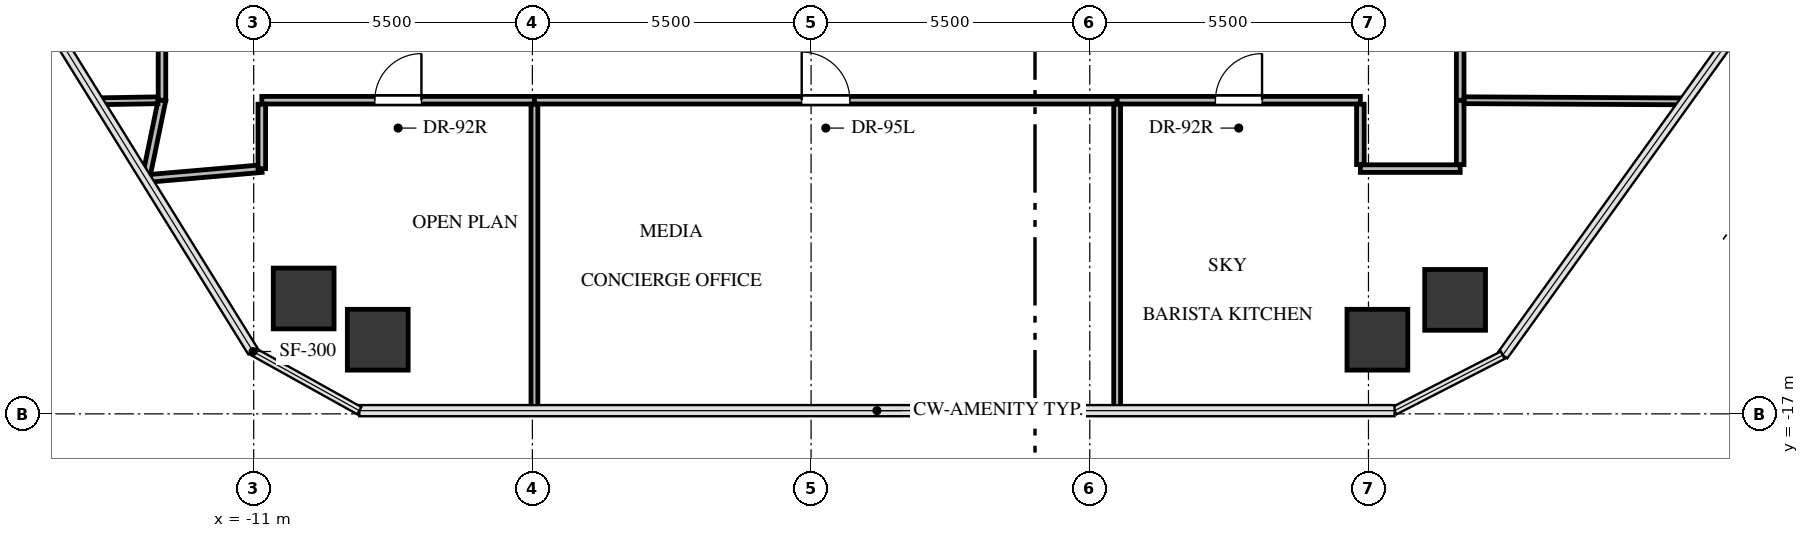
"""IFC4 building model, lengths in metres.
Left out: names, types, materials, properties, quantities, classifications, styles, units other than length and angle.
Written with IfcOpenShell. Run it as: python <this file> out.ifc"""

import sys

from ifc_helpers import new_model, si_unit, direction, frame, frame_2d, origin, origin_2d, place, context, subcontext, project, spatial, rectangle, extrude, source, transform, mapped, element, fill, save


model = new_model("IFC4")
c1 = context("Model", 3, precision=1e-05, world=origin(), true_north=direction((0.0, 1.0)))
c2 = subcontext(c1, "Body", "Model", "MODEL_VIEW")
j1 = project(units=[si_unit("LENGTHUNIT", "METRE"), si_unit("PLANEANGLEUNIT", "RADIAN")], contexts=[c1])
p1 = place(None, origin())
s1 = spatial("IfcSite", under=j1, at=p1, CompositionType="ELEMENT")
p2 = place(p1, origin())
s2 = spatial("IfcBuilding", under=s1, at=p2, CompositionType="ELEMENT")
p3 = place(p2, frame((0.0, 0.0, 93.3)))
s3 = spatial("IfcBuildingStorey", under=s2, at=p3, CompositionType="ELEMENT", Elevation=93.3)
m1 = source(origin(), c2, "Body", "SweptSolid", [
    extrude(rectangle(XDim=1.2, YDim=1.2, at=origin_2d()), origin(), (0.0, 0.0, 1.0), 4.26),
])
for number, where, z_axis, x_axis in (
    (1, (-10.014, -14.723, -0.3), (0.0, 0.0, 1.0), (1.0, 0.0, 0.0)),
    (2, (12.71, -14.75, -0.3), (0.0, 0.0, 1.0), (1.0, 0.0, 0.0)),
    (3, (11.176, -15.537, -0.3), (0.0, 0.0, 1.0), (1.0, 0.0, 0.0)),
    (4, (-8.552, -15.537, -0.3), (0.0, 0.0, 1.0), (1.0, 0.0, 0.0)),
):
    element("IfcColumn", number, at=place(p3, frame(where, z_axis=z_axis, x_axis=x_axis)), inside=s3, PredefinedType="COLUMN", context=c2, shape_type="MappedRepresentation", body=[
        mapped(m1, transform((0.0, 0.0, 0.0), x_axis=(1.0, 0.0, 0.0), y_axis=(0.0, 1.0, 0.0), z_axis=(0.0, 0.0, 1.0), scale=1.0)),
    ])
p4 = place(p3, frame((-10.84, -10.81, 0.0), z_axis=(0.0, 0.0, 1.0), x_axis=(1.0, 0.0, 0.0)))
e5 = element("IfcWall", 5, at=p4, inside=s3, PredefinedType="PARTITIONING", context=c2, shape_type="SweptSolid", body=[
    extrude(rectangle(XDim=5.38, YDim=0.15, at=frame_2d((2.69, 0.0))), origin(), (0.0, 0.0, 1.0), 3.112),
])
p5 = place(p4, frame((2.23, 0.0, 0.0)))
e6 = element("IfcOpeningElement", 6, at=p5, cuts=e5, PredefinedType="OPENING", context=c2, shape_type="SweptSolid", body=[
    extrude(rectangle(XDim=0.92, YDim=2.1, at=frame_2d((0.46, 1.05))), frame((0.0, 0.085, 0.0), z_axis=(0.0, -1.0, 0.0), x_axis=(1.0, 0.0, 0.0)), (0.0, 0.0, 1.0), 0.17),
])
p6 = place(p3, frame((-13.129, -12.358, 0.0), z_axis=(0.0, 0.0, 1.0), x_axis=(0.996279168698, 0.086184789953, 0.0)))
e7 = element("IfcWall", 7, at=p6, inside=s3, PredefinedType="PARTITIONING", context=c2, shape_type="SweptSolid", body=[
    extrude(rectangle(XDim=2.297, YDim=0.15, at=frame_2d((1.149, 0.0))), origin(), (0.0, 0.0, 1.0), 3.28),
])
p7 = place(p3, frame((-12.81, -10.81, 0.0), z_axis=(0.0, 0.0, 1.0), x_axis=(-0.201786289638, -0.979429575474, 0.0)))
e8 = element("IfcWall", 8, at=p7, inside=s3, PredefinedType="PARTITIONING", context=c2, shape_type="SweptSolid", body=[
    extrude(rectangle(XDim=1.498, YDim=0.15, at=frame_2d((0.749, 0.0))), origin(), (0.0, 0.0, 1.0), 3.945),
])
p8 = place(p3, frame((-10.84, -12.16, 0.0), z_axis=(0.0, 0.0, 1.0), x_axis=(0.0, 1.0, 0.0)))
e9 = element("IfcWall", 9, at=p8, inside=s3, PredefinedType="PARTITIONING", context=c2, shape_type="SweptSolid", body=[
    extrude(rectangle(XDim=1.271, YDim=0.15, at=frame_2d((0.635, 0.0))), origin(), (0.0, 0.0, 1.0), 3.945),
])
p9 = place(p3, frame((-5.46, -10.81, 0.0), z_axis=(0.0, 0.0, 1.0), x_axis=(1.0, 0.0, 0.0)))
e10 = element("IfcWall", 10, at=p9, inside=s3, PredefinedType="PARTITIONING", context=c2, shape_type="SweptSolid", body=[
    extrude(rectangle(XDim=11.5, YDim=0.15, at=frame_2d((5.75, 0.0))), origin(), (0.0, 0.0, 1.0), 3.112),
])
p10 = place(p9, frame((5.275, 0.0, 0.0)))
e11 = element("IfcOpeningElement", 11, at=p10, cuts=e10, PredefinedType="OPENING", context=c2, shape_type="SweptSolid", body=[
    extrude(rectangle(XDim=0.95, YDim=2.1, at=frame_2d((0.475, 1.05))), frame((0.0, 0.085, 0.0), z_axis=(0.0, -1.0, 0.0), x_axis=(1.0, 0.0, 0.0)), (0.0, 0.0, 1.0), 0.17),
])
p11 = place(p3, frame((6.04, -10.81, 0.0), z_axis=(0.0, 0.0, 1.0), x_axis=(1.0, 0.0, 0.0)))
e12 = element("IfcWall", 12, at=p11, inside=s3, PredefinedType="PARTITIONING", context=c2, shape_type="SweptSolid", body=[
    extrude(rectangle(XDim=4.8, YDim=0.15, at=frame_2d((2.4, 0.0))), origin(), (0.0, 0.0, 1.0), 3.112),
])
p12 = place(p11, frame((1.94, 0.0, 0.0)))
e13 = element("IfcOpeningElement", 13, at=p12, cuts=e12, PredefinedType="OPENING", context=c2, shape_type="SweptSolid", body=[
    extrude(rectangle(XDim=0.92, YDim=2.1, at=frame_2d((0.46, 1.05))), frame((0.0, 0.085, 0.0), z_axis=(0.0, -1.0, 0.0), x_axis=(1.0, 0.0, 0.0)), (0.0, 0.0, 1.0), 0.17),
])
p13 = place(p3, frame((10.84, -12.16, 0.0), z_axis=(0.0, 0.0, 1.0), x_axis=(1.0, 0.0, 0.0)))
e14 = element("IfcWall", 14, at=p13, inside=s3, PredefinedType="PARTITIONING", context=c2, shape_type="SweptSolid", body=[
    extrude(rectangle(XDim=1.97, YDim=0.15, at=frame_2d((0.985, 0.0))), origin(), (0.0, 0.0, 1.0), 3.945),
])
p14 = place(p3, frame((10.84, -10.889, 0.0), z_axis=(0.0, 0.0, 1.0), x_axis=(0.0, -1.0, 0.0)))
e15 = element("IfcWall", 15, at=p14, inside=s3, PredefinedType="PARTITIONING", context=c2, shape_type="SweptSolid", body=[
    extrude(rectangle(XDim=1.192, YDim=0.15, at=frame_2d((0.596, 0.0))), origin(), (0.0, 0.0, 1.0), 3.945),
])
p15 = place(p3, frame((12.81, -12.081, 0.0), z_axis=(0.0, 0.0, 1.0), x_axis=(0.0, 1.0, 0.0)))
e16 = element("IfcWall", 16, at=p15, inside=s3, PredefinedType="PARTITIONING", context=c2, shape_type="SweptSolid", body=[
    extrude(rectangle(XDim=1.271, YDim=0.15, at=frame_2d((0.635, 0.0))), origin(), (0.0, 0.0, 1.0), 3.945),
])
p16 = place(p3, frame((-12.81, 10.81, 0.0), z_axis=(0.0, 0.0, 1.0), x_axis=(0.0, -1.0, 0.0)))
e17 = element("IfcWall", 17, at=p16, inside=s3, PredefinedType="PARTITIONING", context=c2, shape_type="SweptSolid", body=[
    extrude(rectangle(XDim=21.62, YDim=0.15, at=frame_2d((10.81, 0.0))), origin(), (0.0, 0.0, 1.0), 3.112),
])
p17 = place(p16, frame((10.36, 0.0, 0.0)))
e18 = element("IfcOpeningElement", 18, at=p17, cuts=e17, PredefinedType="OPENING", context=c2, shape_type="SweptSolid", body=[
    extrude(rectangle(XDim=0.9, YDim=2.05, at=frame_2d((0.45, 1.025))), frame((0.0, 0.085, 0.0), z_axis=(0.0, -1.0, 0.0), x_axis=(1.0, 0.0, 0.0)), (0.0, 0.0, 1.0), 0.17),
])
p18 = place(p3, frame((12.81, -10.81, 0.0), z_axis=(0.0, 0.0, 1.0), x_axis=(0.0, 1.0, 0.0)))
e19 = element("IfcWall", 19, at=p18, inside=s3, PredefinedType="PARTITIONING", context=c2, shape_type="SweptSolid", body=[
    extrude(rectangle(XDim=2.37, YDim=0.15, at=frame_2d((1.185, 0.0))), origin(), (0.0, 0.0, 1.0), 3.945),
])
p19 = place(p3, frame((-5.46, -10.889, 0.0), z_axis=(0.0, 0.0, 1.0), x_axis=(0.0, -1.0, 0.0)))
e20 = element("IfcWall", 20, at=p19, inside=s3, PredefinedType="PARTITIONING", context=c2, shape_type="SweptSolid", body=[
    extrude(rectangle(XDim=6.048, YDim=0.135, at=frame_2d((3.024, 0.0))), origin(), (0.0, 0.0, 1.0), 3.112),
])
p20 = place(p3, frame((-14.076, -10.831, 0.0), z_axis=(0.0, 0.0, 1.0), x_axis=(0.999860796611, 0.016684945308, 0.0)))
e21 = element("IfcWall", 21, at=p20, inside=s3, PredefinedType="PARTITIONING", context=c2, shape_type="SweptSolid", body=[
    extrude(rectangle(XDim=1.185, YDim=0.135, at=frame_2d((0.593, 0.0))), origin(), (0.0, 0.0, 1.0), 3.945),
])
p21 = place(p3, frame((6.04, -10.889, 0.0), z_axis=(0.0, 0.0, 1.0), x_axis=(0.0, -1.0, 0.0)))
e22 = element("IfcWall", 22, at=p21, inside=s3, PredefinedType="PARTITIONING", context=c2, shape_type="SweptSolid", body=[
    extrude(rectangle(XDim=6.048, YDim=0.135, at=frame_2d((3.024, 0.0))), origin(), (0.0, 0.0, 1.0), 3.112),
])
p22 = place(p3, frame((12.889, -10.81, 0.0), z_axis=(0.0, 0.0, 1.0), x_axis=(0.999986140562, -0.005264853658, 0.0)))
e23 = element("IfcWall", 23, at=p22, inside=s3, PredefinedType="PARTITIONING", context=c2, shape_type="SweptSolid", body=[
    extrude(rectangle(XDim=4.359, YDim=0.135, at=frame_2d((2.179, 0.0))), origin(), (0.0, 0.0, 1.0), 3.28),
])
m2 = source(origin(), c2, "Body", "SweptSolid", [
    extrude(rectangle(XDim=0.92, YDim=2.1, at=frame_2d((0.46, 1.05))), frame((0.0, 0.025, 0.0), z_axis=(0.0, -1.0, 0.0), x_axis=(1.0, 0.0, 0.0)), (0.0, 0.0, 1.0), 0.05),
])
p23 = place(p5, origin())
e24 = element("IfcDoor", 24, at=p23, inside=s3, OperationType="SINGLE_SWING_RIGHT", PredefinedType="DOOR", context=c2, shape_type="MappedRepresentation", body=[
    mapped(m2, transform((0.0, 0.0, 0.0), x_axis=(1.0, 0.0, 0.0), y_axis=(0.0, 1.0, 0.0), z_axis=(0.0, 0.0, 1.0), scale=1.0)),
])
fill(e6, e24)
m3 = source(origin(), c2, "Body", "SweptSolid", [
    extrude(rectangle(XDim=0.95, YDim=2.1, at=frame_2d((0.475, 1.05))), frame((0.0, 0.025, 0.0), z_axis=(0.0, -1.0, 0.0), x_axis=(1.0, 0.0, 0.0)), (0.0, 0.0, 1.0), 0.05),
])
p24 = place(p10, origin())
e25 = element("IfcDoor", 25, at=p24, inside=s3, OperationType="SINGLE_SWING_LEFT", PredefinedType="DOOR", context=c2, shape_type="MappedRepresentation", body=[
    mapped(m3, transform((0.0, 0.0, 0.0), x_axis=(1.0, 0.0, 0.0), y_axis=(0.0, 1.0, 0.0), z_axis=(0.0, 0.0, 1.0), scale=1.0)),
])
fill(e11, e25)
p25 = place(p12, origin())
e26 = element("IfcDoor", 26, at=p25, inside=s3, OperationType="SINGLE_SWING_RIGHT", PredefinedType="DOOR", context=c2, shape_type="MappedRepresentation", body=[
    mapped(m2, transform((0.0, 0.0, 0.0), x_axis=(1.0, 0.0, 0.0), y_axis=(0.0, 1.0, 0.0), z_axis=(0.0, 0.0, 1.0), scale=1.0)),
])
fill(e13, e26)
save(model, sys.argv[1])
